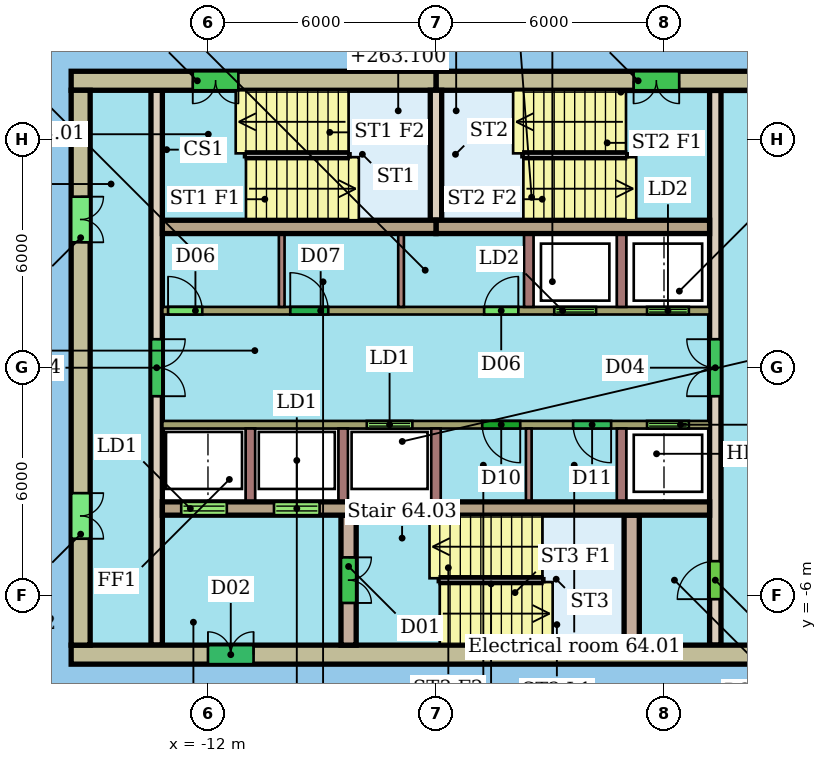
"""IFC4 building model, lengths in metres.
Left out: names, types, materials, properties, quantities, classifications, styles, units other than length and angle.
Written with IfcOpenShell. Run it as: python <this file> out.ifc"""

import sys

from ifc_helpers import new_model, si_unit, direction, frame, frame_2d, origin, place, context, subcontext, project, spatial, rectangle, extrude, element, fill, save


model = new_model("IFC4")
c1 = context("Model", 3, precision=1e-05, world=origin(), true_north=direction((0.0, 1.0)))
c2 = subcontext(c1, "Body", "Model", "MODEL_VIEW")
j1 = project(units=[si_unit("LENGTHUNIT", "METRE"), si_unit("PLANEANGLEUNIT", "RADIAN")], contexts=[c1])
p1 = place(None, origin())
s1 = spatial("IfcSite", under=j1, at=p1, CompositionType="ELEMENT")
p2 = place(p1, origin())
s2 = spatial("IfcBuilding", under=s1, at=p2, CompositionType="ELEMENT")
p3 = place(p2, frame((0.0, 0.0, 261.3)))
s3 = spatial("IfcBuildingStorey", under=s2, at=p3, CompositionType="ELEMENT", Elevation=261.3)
p4 = place(p3, frame((3.6, 7.55, 0.0), z_axis=(0.0, 0.0, 1.0), x_axis=(-1.0, 0.0, 0.0)))
e1 = element("IfcWall", 1, at=p4, inside=s3, PredefinedType="SHEAR", context=c2, shape_type="SweptSolid", body=[
    extrude(rectangle(XDim=9.6, YDim=0.5, at=frame_2d((4.8, 0.0))), origin(), (0.0, 0.0, 1.0), 3.3),
])
p5 = place(p4, frame((3.2, 0.0, 0.0)))
e2 = element("IfcOpeningElement", 2, at=p5, cuts=e1, PredefinedType="OPENING", context=c2, shape_type="SweptSolid", body=[
    extrude(rectangle(XDim=1.2, YDim=2.1, at=frame_2d((0.6, 1.05))), frame((0.0, 0.26, 0.0), z_axis=(0.0, -1.0, 0.0), x_axis=(1.0, 0.0, 0.0)), (0.0, 0.0, 1.0), 0.52),
])
p6 = place(p3, frame((-6.0, 7.55, 0.0), z_axis=(0.0, 0.0, 1.0), x_axis=(-1.0, 0.0, 0.0)))
e3 = element("IfcWall", 3, at=p6, inside=s3, PredefinedType="SHEAR", context=c2, shape_type="SweptSolid", body=[
    extrude(rectangle(XDim=9.6, YDim=0.5, at=frame_2d((4.8, 0.0))), origin(), (0.0, 0.0, 1.0), 3.3),
])
p7 = place(p6, frame((5.2, 0.0, 0.0)))
e4 = element("IfcOpeningElement", 4, at=p7, cuts=e3, PredefinedType="OPENING", context=c2, shape_type="SweptSolid", body=[
    extrude(rectangle(XDim=1.2, YDim=2.1, at=frame_2d((0.6, 1.05))), frame((0.0, 0.26, 0.0), z_axis=(0.0, -1.0, 0.0), x_axis=(1.0, 0.0, 0.0)), (0.0, 0.0, 1.0), 0.52),
])
p8 = place(p3, frame((-15.6, -7.55, 0.0), z_axis=(0.0, 0.0, 1.0), x_axis=(1.0, 0.0, 0.0)))
e5 = element("IfcWall", 5, at=p8, inside=s3, PredefinedType="SHEAR", context=c2, shape_type="SweptSolid", body=[
    extrude(rectangle(XDim=19.2, YDim=0.5, at=frame_2d((9.6, 0.0))), origin(), (0.0, 0.0, 1.0), 3.3),
])
p9 = place(p8, frame((3.6, 0.0, 0.0)))
e6 = element("IfcOpeningElement", 6, at=p9, cuts=e5, PredefinedType="OPENING", context=c2, shape_type="SweptSolid", body=[
    extrude(rectangle(XDim=1.2, YDim=2.1, at=frame_2d((0.6, 1.05))), frame((0.0, 0.26, 0.0), z_axis=(0.0, -1.0, 0.0), x_axis=(1.0, 0.0, 0.0)), (0.0, 0.0, 1.0), 0.52),
])
p10 = place(p3, frame((-15.35, 7.3, 0.0), z_axis=(0.0, 0.0, 1.0), x_axis=(0.0, -1.0, 0.0)))
e7 = element("IfcWall", 7, at=p10, inside=s3, PredefinedType="SHEAR", context=c2, shape_type="SweptSolid", body=[
    extrude(rectangle(XDim=14.6, YDim=0.5, at=frame_2d((7.3, 0.0))), origin(), (0.0, 0.0, 1.0), 3.3),
])
p11 = place(p10, frame((10.6, 0.0, 0.0)))
e8 = element("IfcOpeningElement", 8, at=p11, cuts=e7, PredefinedType="OPENING", context=c2, shape_type="SweptSolid", body=[
    extrude(rectangle(XDim=1.2, YDim=2.1, at=frame_2d((0.6, 1.05))), frame((0.0, 0.26, 0.0), z_axis=(0.0, -1.0, 0.0), x_axis=(1.0, 0.0, 0.0)), (0.0, 0.0, 1.0), 0.52),
])
p12 = place(p10, frame((2.8, 0.0, 0.0)))
e9 = element("IfcOpeningElement", 9, at=p12, cuts=e7, PredefinedType="OPENING", context=c2, shape_type="SweptSolid", body=[
    extrude(rectangle(XDim=1.2, YDim=2.1, at=frame_2d((0.6, 1.05))), frame((0.0, 0.26, 0.0), z_axis=(0.0, -1.0, 0.0), x_axis=(1.0, 0.0, 0.0)), (0.0, 0.0, 1.0), 0.52),
])
for number, where, z_axis, x_axis in (
    (10, (-13.2, 3.705, 0.0), (0.0, 0.0, 1.0), (1.0, 0.0, 0.0)),
    (11, (-6.0, 3.705, 0.0), (0.0, 0.0, 1.0), (1.0, 0.0, 0.0)),
):
    element("IfcWall", number, at=place(p3, frame(where, z_axis=z_axis, x_axis=x_axis)), inside=s3, PredefinedType="SHEAR", context=c2, shape_type="SweptSolid", body=[
        extrude(rectangle(XDim=7.2, YDim=0.35, at=frame_2d((3.6, 0.0))), origin(), (0.0, 0.0, 1.0), 3.3),
    ])
p13 = place(p3, frame((-13.2, -3.705, 0.0), z_axis=(0.0, 0.0, 1.0), x_axis=(1.0, 0.0, 0.0)))
e12 = element("IfcWall", 12, at=p13, inside=s3, PredefinedType="SHEAR", context=c2, shape_type="SweptSolid", body=[
    extrude(rectangle(XDim=7.2, YDim=0.35, at=frame_2d((3.6, 0.0))), origin(), (0.0, 0.0, 1.0), 3.3),
])
p14 = place(p13, frame((0.496, 0.0, 0.0)))
e13 = element("IfcOpeningElement", 13, at=p14, cuts=e12, PredefinedType="OPENING", context=c2, shape_type="SweptSolid", body=[
    extrude(rectangle(XDim=1.2, YDim=2.1, at=frame_2d((0.6, 1.05))), frame((0.0, 0.185, 0.0), z_axis=(0.0, -1.0, 0.0), x_axis=(1.0, 0.0, 0.0)), (0.0, 0.0, 1.0), 0.37),
])
p15 = place(p13, frame((2.938, 0.0, 0.0)))
e14 = element("IfcOpeningElement", 14, at=p15, cuts=e12, PredefinedType="OPENING", context=c2, shape_type="SweptSolid", body=[
    extrude(rectangle(XDim=1.2, YDim=2.1, at=frame_2d((0.6, 1.05))), frame((0.0, 0.185, 0.0), z_axis=(0.0, -1.0, 0.0), x_axis=(1.0, 0.0, 0.0)), (0.0, 0.0, 1.0), 0.37),
])
p16 = place(p3, frame((-6.0, -3.705, 0.0), z_axis=(0.0, 0.0, 1.0), x_axis=(1.0, 0.0, 0.0)))
e15 = element("IfcWall", 15, at=p16, inside=s3, PredefinedType="SHEAR", context=c2, shape_type="SweptSolid", body=[
    extrude(rectangle(XDim=7.2, YDim=0.35, at=frame_2d((3.6, 0.0))), origin(), (0.0, 0.0, 1.0), 3.3),
])
p17 = place(p3, frame((-13.35, 7.3, 0.0), z_axis=(0.0, 0.0, 1.0), x_axis=(0.0, -1.0, 0.0)))
e16 = element("IfcWall", 16, at=p17, inside=s3, PredefinedType="SHEAR", context=c2, shape_type="SweptSolid", body=[
    extrude(rectangle(XDim=14.6, YDim=0.3, at=frame_2d((7.3, 0.0))), origin(), (0.0, 0.0, 1.0), 3.3),
])
p18 = place(p17, frame((6.55, 0.0, 0.0)))
e17 = element("IfcOpeningElement", 17, at=p18, cuts=e16, PredefinedType="OPENING", context=c2, shape_type="SweptSolid", body=[
    extrude(rectangle(XDim=1.5, YDim=2.1, at=frame_2d((0.75, 1.05))), frame((0.0, 0.16, 0.0), z_axis=(0.0, -1.0, 0.0), x_axis=(1.0, 0.0, 0.0)), (0.0, 0.0, 1.0), 0.32),
])
p19 = place(p3, frame((1.35, -7.3, 0.0), z_axis=(0.0, 0.0, 1.0), x_axis=(0.0, 1.0, 0.0)))
e18 = element("IfcWall", 18, at=p19, inside=s3, PredefinedType="SHEAR", context=c2, shape_type="SweptSolid", body=[
    extrude(rectangle(XDim=14.6, YDim=0.3, at=frame_2d((7.3, 0.0))), origin(), (0.0, 0.0, 1.0), 3.3),
])
p20 = place(p19, frame((1.21, 0.0, 0.0)))
e19 = element("IfcOpeningElement", 19, at=p20, cuts=e18, PredefinedType="OPENING", context=c2, shape_type="SweptSolid", body=[
    extrude(rectangle(XDim=1.0, YDim=2.1, at=frame_2d((0.5, 1.05))), frame((0.0, 0.16, 0.0), z_axis=(0.0, -1.0, 0.0), x_axis=(1.0, 0.0, 0.0)), (0.0, 0.0, 1.0), 0.32),
])
p21 = place(p19, frame((6.55, 0.0, 0.0)))
e20 = element("IfcOpeningElement", 20, at=p21, cuts=e18, PredefinedType="OPENING", context=c2, shape_type="SweptSolid", body=[
    extrude(rectangle(XDim=1.5, YDim=2.1, at=frame_2d((0.75, 1.05))), frame((0.0, 0.16, 0.0), z_axis=(0.0, -1.0, 0.0), x_axis=(1.0, 0.0, 0.0)), (0.0, 0.0, 1.0), 0.32),
])
p22 = place(p3, frame((-13.2, 1.5, 0.0), z_axis=(0.0, 0.0, 1.0), x_axis=(1.0, 0.0, 0.0)))
e21 = element("IfcWall", 21, at=p22, inside=s3, PredefinedType="SHEAR", context=c2, shape_type="SweptSolid", body=[
    extrude(rectangle(XDim=14.4, YDim=0.2, at=frame_2d((7.2, 0.0))), origin(), (0.0, 0.0, 1.0), 3.3),
])
p23 = place(p22, frame((10.312, 0.0, 0.0)))
e22 = element("IfcOpeningElement", 22, at=p23, cuts=e21, PredefinedType="OPENING", context=c2, shape_type="SweptSolid", body=[
    extrude(rectangle(XDim=1.1, YDim=2.1, at=frame_2d((0.55, 1.05))), frame((0.0, 0.11, 0.0), z_axis=(0.0, -1.0, 0.0), x_axis=(1.0, 0.0, 0.0)), (0.0, 0.0, 1.0), 0.22),
])
p24 = place(p22, frame((12.754, 0.0, 0.0)))
e23 = element("IfcOpeningElement", 23, at=p24, cuts=e21, PredefinedType="OPENING", context=c2, shape_type="SweptSolid", body=[
    extrude(rectangle(XDim=1.1, YDim=2.1, at=frame_2d((0.55, 1.05))), frame((0.0, 0.11, 0.0), z_axis=(0.0, -1.0, 0.0), x_axis=(1.0, 0.0, 0.0)), (0.0, 0.0, 1.0), 0.22),
])
p25 = place(p22, frame((0.15, 0.0, 0.0)))
e24 = element("IfcOpeningElement", 24, at=p25, cuts=e21, PredefinedType="OPENING", context=c2, shape_type="SweptSolid", body=[
    extrude(rectangle(XDim=0.9, YDim=2.1, at=frame_2d((0.45, 1.05))), frame((0.0, 0.11, 0.0), z_axis=(0.0, -1.0, 0.0), x_axis=(1.0, 0.0, 0.0)), (0.0, 0.0, 1.0), 0.22),
])
p26 = place(p22, frame((3.365, 0.0, 0.0)))
e25 = element("IfcOpeningElement", 25, at=p26, cuts=e21, PredefinedType="OPENING", context=c2, shape_type="SweptSolid", body=[
    extrude(rectangle(XDim=1.0, YDim=2.1, at=frame_2d((0.5, 1.05))), frame((0.0, 0.11, 0.0), z_axis=(0.0, -1.0, 0.0), x_axis=(1.0, 0.0, 0.0)), (0.0, 0.0, 1.0), 0.22),
])
p27 = place(p22, frame((8.467, 0.0, 0.0)))
e26 = element("IfcOpeningElement", 26, at=p27, cuts=e21, PredefinedType="OPENING", context=c2, shape_type="SweptSolid", body=[
    extrude(rectangle(XDim=0.9, YDim=2.1, at=frame_2d((0.45, 1.05))), frame((0.0, 0.11, 0.0), z_axis=(0.0, -1.0, 0.0), x_axis=(1.0, 0.0, 0.0)), (0.0, 0.0, 1.0), 0.22),
])
p28 = place(p3, frame((1.2, -1.5, 0.0), z_axis=(0.0, 0.0, 1.0), x_axis=(-1.0, 0.0, 0.0)))
e27 = element("IfcWall", 27, at=p28, inside=s3, PredefinedType="SHEAR", context=c2, shape_type="SweptSolid", body=[
    extrude(rectangle(XDim=14.4, YDim=0.2, at=frame_2d((7.2, 0.0))), origin(), (0.0, 0.0, 1.0), 3.3),
])
p29 = place(p28, frame((7.821, 0.0, 0.0)))
e28 = element("IfcOpeningElement", 28, at=p29, cuts=e27, PredefinedType="OPENING", context=c2, shape_type="SweptSolid", body=[
    extrude(rectangle(XDim=1.2, YDim=2.1, at=frame_2d((0.6, 1.05))), frame((0.0, 0.11, 0.0), z_axis=(0.0, -1.0, 0.0), x_axis=(1.0, 0.0, 0.0)), (0.0, 0.0, 1.0), 0.22),
])
p30 = place(p28, frame((0.546, 0.0, 0.0)))
e29 = element("IfcOpeningElement", 29, at=p30, cuts=e27, PredefinedType="OPENING", context=c2, shape_type="SweptSolid", body=[
    extrude(rectangle(XDim=1.1, YDim=2.1, at=frame_2d((0.55, 1.05))), frame((0.0, 0.11, 0.0), z_axis=(0.0, -1.0, 0.0), x_axis=(1.0, 0.0, 0.0)), (0.0, 0.0, 1.0), 0.22),
])
p31 = place(p28, frame((4.983, 0.0, 0.0)))
e30 = element("IfcOpeningElement", 30, at=p31, cuts=e27, PredefinedType="OPENING", context=c2, shape_type="SweptSolid", body=[
    extrude(rectangle(XDim=1.0, YDim=2.1, at=frame_2d((0.5, 1.05))), frame((0.0, 0.11, 0.0), z_axis=(0.0, -1.0, 0.0), x_axis=(1.0, 0.0, 0.0)), (0.0, 0.0, 1.0), 0.22),
])
p32 = place(p28, frame((2.592, 0.0, 0.0)))
e31 = element("IfcOpeningElement", 31, at=p32, cuts=e27, PredefinedType="OPENING", context=c2, shape_type="SweptSolid", body=[
    extrude(rectangle(XDim=1.0, YDim=2.1, at=frame_2d((0.5, 1.05))), frame((0.0, 0.11, 0.0), z_axis=(0.0, -1.0, 0.0), x_axis=(1.0, 0.0, 0.0)), (0.0, 0.0, 1.0), 0.22),
])
p33 = place(p3, frame((-8.3, -3.88, 0.0), z_axis=(0.0, 0.0, 1.0), x_axis=(0.0, -1.0, 0.0)))
e32 = element("IfcWall", 32, at=p33, inside=s3, PredefinedType="SHEAR", context=c2, shape_type="SweptSolid", body=[
    extrude(rectangle(XDim=3.42, YDim=0.4, at=frame_2d((1.71, 0.0))), origin(), (0.0, 0.0, 1.0), 3.3),
])
p34 = place(p33, frame((1.11, 0.0, 0.0)))
e33 = element("IfcOpeningElement", 33, at=p34, cuts=e32, PredefinedType="OPENING", context=c2, shape_type="SweptSolid", body=[
    extrude(rectangle(XDim=1.2, YDim=2.1, at=frame_2d((0.6, 1.05))), frame((0.0, 0.21, 0.0), z_axis=(0.0, -1.0, 0.0), x_axis=(1.0, 0.0, 0.0)), (0.0, 0.0, 1.0), 0.42),
])
p35 = place(p3, frame((-0.85, -3.88, 0.0), z_axis=(0.0, 0.0, 1.0), x_axis=(0.0, -1.0, 0.0)))
e34 = element("IfcWall", 34, at=p35, inside=s3, PredefinedType="SHEAR", context=c2, shape_type="SweptSolid", body=[
    extrude(rectangle(XDim=3.42, YDim=0.4, at=frame_2d((1.71, 0.0))), origin(), (0.0, 0.0, 1.0), 3.3),
])
p36 = place(p3, frame((-6.0, 3.88, 0.0), z_axis=(0.0, 0.0, 1.0), x_axis=(0.0, 1.0, 0.0)))
e35 = element("IfcWall", 35, at=p36, inside=s3, PredefinedType="SHEAR", context=c2, shape_type="SweptSolid", body=[
    extrude(rectangle(XDim=3.42, YDim=0.3, at=frame_2d((1.71, 0.0))), origin(), (0.0, 0.0, 1.0), 3.3),
])
for number, where, z_axis, x_axis in (
    (36, (-3.558, 1.6, 0.0), (0.0, 0.0, 1.0), (0.0, 1.0, 0.0)),
    (37, (-1.117, 1.6, 0.0), (0.0, 0.0, 1.0), (0.0, 1.0, 0.0)),
):
    element("IfcWall", number, at=place(p3, frame(where, z_axis=z_axis, x_axis=x_axis)), inside=s3, PredefinedType="SHEAR", context=c2, shape_type="SweptSolid", body=[
        extrude(rectangle(XDim=1.93, YDim=0.25, at=frame_2d((0.965, 0.0))), origin(), (0.0, 0.0, 1.0), 3.3),
    ])
for number, where, z_axis, x_axis in (
    (38, (-10.06, 1.6, 0.0), (0.0, 0.0, 1.0), (0.0, 1.0, 0.0)),
    (39, (-6.919, 1.6, 0.0), (0.0, 0.0, 1.0), (0.0, 1.0, 0.0)),
):
    element("IfcWall", number, at=place(p3, frame(where, z_axis=z_axis, x_axis=x_axis)), inside=s3, PredefinedType="PARTITIONING", context=c2, shape_type="SweptSolid", body=[
        extrude(rectangle(XDim=1.93, YDim=0.15, at=frame_2d((0.965, 0.0))), origin(), (0.0, 0.0, 1.0), 3.3),
    ])
for number, where, z_axis, x_axis in (
    (40, (-10.883, -1.6, 0.0), (0.0, 0.0, 1.0), (0.0, -1.0, 0.0)),
    (41, (-8.442, -1.6, 0.0), (0.0, 0.0, 1.0), (0.0, -1.0, 0.0)),
    (42, (-6.0, -1.6, 0.0), (0.0, 0.0, 1.0), (0.0, -1.0, 0.0)),
    (43, (-1.117, -1.6, 0.0), (0.0, 0.0, 1.0), (0.0, -1.0, 0.0)),
):
    element("IfcWall", number, at=place(p3, frame(where, z_axis=z_axis, x_axis=x_axis)), inside=s3, PredefinedType="SHEAR", context=c2, shape_type="SweptSolid", body=[
        extrude(rectangle(XDim=1.93, YDim=0.25, at=frame_2d((0.965, 0.0))), origin(), (0.0, 0.0, 1.0), 3.3),
    ])
p37 = place(p3, frame((-3.558, -1.6, 0.0), z_axis=(0.0, 0.0, 1.0), x_axis=(0.0, -1.0, 0.0)))
e44 = element("IfcWall", 44, at=p37, inside=s3, PredefinedType="PARTITIONING", context=c2, shape_type="SweptSolid", body=[
    extrude(rectangle(XDim=1.93, YDim=0.15, at=frame_2d((0.965, 0.0))), origin(), (0.0, 0.0, 1.0), 3.3),
])
p38 = place(p5, origin())
e45 = element("IfcDoor", 45, at=p38, inside=s3, OperationType="DOUBLE_DOOR_SINGLE_SWING", PredefinedType="NOTDEFINED", context=c2, shape_type="SweptSolid", body=[
    extrude(rectangle(XDim=1.2, YDim=2.1, at=frame_2d((0.6, 1.05))), frame((0.0, 0.025, 0.0), z_axis=(0.0, -1.0, 0.0), x_axis=(1.0, 0.0, 0.0)), (0.0, 0.0, 1.0), 0.05),
])
fill(e2, e45)
p39 = place(p7, origin())
e46 = element("IfcDoor", 46, at=p39, inside=s3, OperationType="DOUBLE_DOOR_SINGLE_SWING", PredefinedType="NOTDEFINED", context=c2, shape_type="SweptSolid", body=[
    extrude(rectangle(XDim=1.2, YDim=2.1, at=frame_2d((0.6, 1.05))), frame((0.0, 0.025, 0.0), z_axis=(0.0, -1.0, 0.0), x_axis=(1.0, 0.0, 0.0)), (0.0, 0.0, 1.0), 0.05),
])
fill(e4, e46)
p40 = place(p9, origin())
e47 = element("IfcDoor", 47, at=p40, inside=s3, OperationType="DOUBLE_DOOR_SINGLE_SWING", PredefinedType="NOTDEFINED", context=c2, shape_type="SweptSolid", body=[
    extrude(rectangle(XDim=1.2, YDim=2.1, at=frame_2d((0.6, 1.05))), frame((0.0, 0.025, 0.0), z_axis=(0.0, -1.0, 0.0), x_axis=(1.0, 0.0, 0.0)), (0.0, 0.0, 1.0), 0.05),
])
fill(e6, e47)
p41 = place(p11, origin())
e48 = element("IfcDoor", 48, at=p41, inside=s3, OperationType="DOUBLE_DOOR_SINGLE_SWING", PredefinedType="NOTDEFINED", context=c2, shape_type="SweptSolid", body=[
    extrude(rectangle(XDim=1.2, YDim=2.1, at=frame_2d((0.6, 1.05))), frame((0.0, 0.025, 0.0), z_axis=(0.0, -1.0, 0.0), x_axis=(1.0, 0.0, 0.0)), (0.0, 0.0, 1.0), 0.05),
])
fill(e8, e48)
p42 = place(p12, origin())
e49 = element("IfcDoor", 49, at=p42, inside=s3, OperationType="DOUBLE_DOOR_SINGLE_SWING", PredefinedType="NOTDEFINED", context=c2, shape_type="SweptSolid", body=[
    extrude(rectangle(XDim=1.2, YDim=2.1, at=frame_2d((0.6, 1.05))), frame((0.0, 0.025, 0.0), z_axis=(0.0, -1.0, 0.0), x_axis=(1.0, 0.0, 0.0)), (0.0, 0.0, 1.0), 0.05),
])
fill(e9, e49)
p43 = place(p14, origin())
e50 = element("IfcDoor", 50, at=p43, inside=s3, OperationType="DOUBLE_DOOR_SLIDING", PredefinedType="NOTDEFINED", context=c2, shape_type="SweptSolid", body=[
    extrude(rectangle(XDim=1.2, YDim=2.1, at=frame_2d((0.6, 1.05))), frame((0.0, 0.025, 0.0), z_axis=(0.0, -1.0, 0.0), x_axis=(1.0, 0.0, 0.0)), (0.0, 0.0, 1.0), 0.05),
])
fill(e13, e50)
p44 = place(p15, origin())
e51 = element("IfcDoor", 51, at=p44, inside=s3, OperationType="DOUBLE_DOOR_SLIDING", PredefinedType="NOTDEFINED", context=c2, shape_type="SweptSolid", body=[
    extrude(rectangle(XDim=1.2, YDim=2.1, at=frame_2d((0.6, 1.05))), frame((0.0, 0.025, 0.0), z_axis=(0.0, -1.0, 0.0), x_axis=(1.0, 0.0, 0.0)), (0.0, 0.0, 1.0), 0.05),
])
fill(e14, e51)
p45 = place(p18, origin())
e52 = element("IfcDoor", 52, at=p45, inside=s3, OperationType="DOUBLE_DOOR_SINGLE_SWING", PredefinedType="NOTDEFINED", context=c2, shape_type="SweptSolid", body=[
    extrude(rectangle(XDim=1.5, YDim=2.1, at=frame_2d((0.75, 1.05))), frame((0.0, 0.025, 0.0), z_axis=(0.0, -1.0, 0.0), x_axis=(1.0, 0.0, 0.0)), (0.0, 0.0, 1.0), 0.05),
])
fill(e17, e52)
p46 = place(p20, origin())
e53 = element("IfcDoor", 53, at=p46, inside=s3, OperationType="SINGLE_SWING_LEFT", PredefinedType="NOTDEFINED", context=c2, shape_type="SweptSolid", body=[
    extrude(rectangle(XDim=1.0, YDim=2.1, at=frame_2d((0.5, 1.05))), frame((0.0, 0.025, 0.0), z_axis=(0.0, -1.0, 0.0), x_axis=(1.0, 0.0, 0.0)), (0.0, 0.0, 1.0), 0.05),
])
fill(e19, e53)
p47 = place(p21, origin())
e54 = element("IfcDoor", 54, at=p47, inside=s3, OperationType="DOUBLE_DOOR_SINGLE_SWING", PredefinedType="NOTDEFINED", context=c2, shape_type="SweptSolid", body=[
    extrude(rectangle(XDim=1.5, YDim=2.1, at=frame_2d((0.75, 1.05))), frame((0.0, 0.025, 0.0), z_axis=(0.0, -1.0, 0.0), x_axis=(1.0, 0.0, 0.0)), (0.0, 0.0, 1.0), 0.05),
])
fill(e20, e54)
p48 = place(p23, origin())
e55 = element("IfcDoor", 55, at=p48, inside=s3, OperationType="DOUBLE_DOOR_SLIDING", PredefinedType="NOTDEFINED", context=c2, shape_type="SweptSolid", body=[
    extrude(rectangle(XDim=1.1, YDim=2.1, at=frame_2d((0.55, 1.05))), frame((0.0, 0.025, 0.0), z_axis=(0.0, -1.0, 0.0), x_axis=(1.0, 0.0, 0.0)), (0.0, 0.0, 1.0), 0.05),
])
fill(e22, e55)
p49 = place(p24, origin())
e56 = element("IfcDoor", 56, at=p49, inside=s3, OperationType="DOUBLE_DOOR_SLIDING", PredefinedType="NOTDEFINED", context=c2, shape_type="SweptSolid", body=[
    extrude(rectangle(XDim=1.1, YDim=2.1, at=frame_2d((0.55, 1.05))), frame((0.0, 0.025, 0.0), z_axis=(0.0, -1.0, 0.0), x_axis=(1.0, 0.0, 0.0)), (0.0, 0.0, 1.0), 0.05),
])
fill(e23, e56)
p50 = place(p25, origin())
e57 = element("IfcDoor", 57, at=p50, inside=s3, OperationType="SINGLE_SWING_LEFT", PredefinedType="NOTDEFINED", context=c2, shape_type="SweptSolid", body=[
    extrude(rectangle(XDim=0.9, YDim=2.1, at=frame_2d((0.45, 1.05))), frame((0.0, 0.025, 0.0), z_axis=(0.0, -1.0, 0.0), x_axis=(1.0, 0.0, 0.0)), (0.0, 0.0, 1.0), 0.05),
])
fill(e24, e57)
p51 = place(p26, origin())
e58 = element("IfcDoor", 58, at=p51, inside=s3, OperationType="SINGLE_SWING_LEFT", PredefinedType="NOTDEFINED", context=c2, shape_type="SweptSolid", body=[
    extrude(rectangle(XDim=1.0, YDim=2.1, at=frame_2d((0.5, 1.05))), frame((0.0, 0.025, 0.0), z_axis=(0.0, -1.0, 0.0), x_axis=(1.0, 0.0, 0.0)), (0.0, 0.0, 1.0), 0.05),
])
fill(e25, e58)
p52 = place(p27, origin())
e59 = element("IfcDoor", 59, at=p52, inside=s3, OperationType="SINGLE_SWING_RIGHT", PredefinedType="NOTDEFINED", context=c2, shape_type="SweptSolid", body=[
    extrude(rectangle(XDim=0.9, YDim=2.1, at=frame_2d((0.45, 1.05))), frame((0.0, 0.025, 0.0), z_axis=(0.0, -1.0, 0.0), x_axis=(1.0, 0.0, 0.0)), (0.0, 0.0, 1.0), 0.05),
])
fill(e26, e59)
p53 = place(p29, origin())
e60 = element("IfcDoor", 60, at=p53, inside=s3, OperationType="DOUBLE_DOOR_SLIDING", PredefinedType="NOTDEFINED", context=c2, shape_type="SweptSolid", body=[
    extrude(rectangle(XDim=1.2, YDim=2.1, at=frame_2d((0.6, 1.05))), frame((0.0, 0.025, 0.0), z_axis=(0.0, -1.0, 0.0), x_axis=(1.0, 0.0, 0.0)), (0.0, 0.0, 1.0), 0.05),
])
fill(e28, e60)
p54 = place(p30, origin())
e61 = element("IfcDoor", 61, at=p54, inside=s3, OperationType="DOUBLE_DOOR_SLIDING", PredefinedType="NOTDEFINED", context=c2, shape_type="SweptSolid", body=[
    extrude(rectangle(XDim=1.1, YDim=2.1, at=frame_2d((0.55, 1.05))), frame((0.0, 0.025, 0.0), z_axis=(0.0, -1.0, 0.0), x_axis=(1.0, 0.0, 0.0)), (0.0, 0.0, 1.0), 0.05),
])
fill(e29, e61)
p55 = place(p31, origin())
e62 = element("IfcDoor", 62, at=p55, inside=s3, OperationType="SINGLE_SWING_LEFT", PredefinedType="NOTDEFINED", context=c2, shape_type="SweptSolid", body=[
    extrude(rectangle(XDim=1.0, YDim=2.1, at=frame_2d((0.5, 1.05))), frame((0.0, 0.025, 0.0), z_axis=(0.0, -1.0, 0.0), x_axis=(1.0, 0.0, 0.0)), (0.0, 0.0, 1.0), 0.05),
])
fill(e30, e62)
p56 = place(p32, origin())
e63 = element("IfcDoor", 63, at=p56, inside=s3, OperationType="SINGLE_SWING_LEFT", PredefinedType="NOTDEFINED", context=c2, shape_type="SweptSolid", body=[
    extrude(rectangle(XDim=1.0, YDim=2.1, at=frame_2d((0.5, 1.05))), frame((0.0, 0.025, 0.0), z_axis=(0.0, -1.0, 0.0), x_axis=(1.0, 0.0, 0.0)), (0.0, 0.0, 1.0), 0.05),
])
fill(e31, e63)
p57 = place(p34, origin())
e64 = element("IfcDoor", 64, at=p57, inside=s3, OperationType="DOUBLE_DOOR_SINGLE_SWING", PredefinedType="NOTDEFINED", context=c2, shape_type="SweptSolid", body=[
    extrude(rectangle(XDim=1.2, YDim=2.1, at=frame_2d((0.6, 1.05))), frame((0.0, 0.025, 0.0), z_axis=(0.0, -1.0, 0.0), x_axis=(1.0, 0.0, 0.0)), (0.0, 0.0, 1.0), 0.05),
])
fill(e33, e64)
save(model, sys.argv[1])
